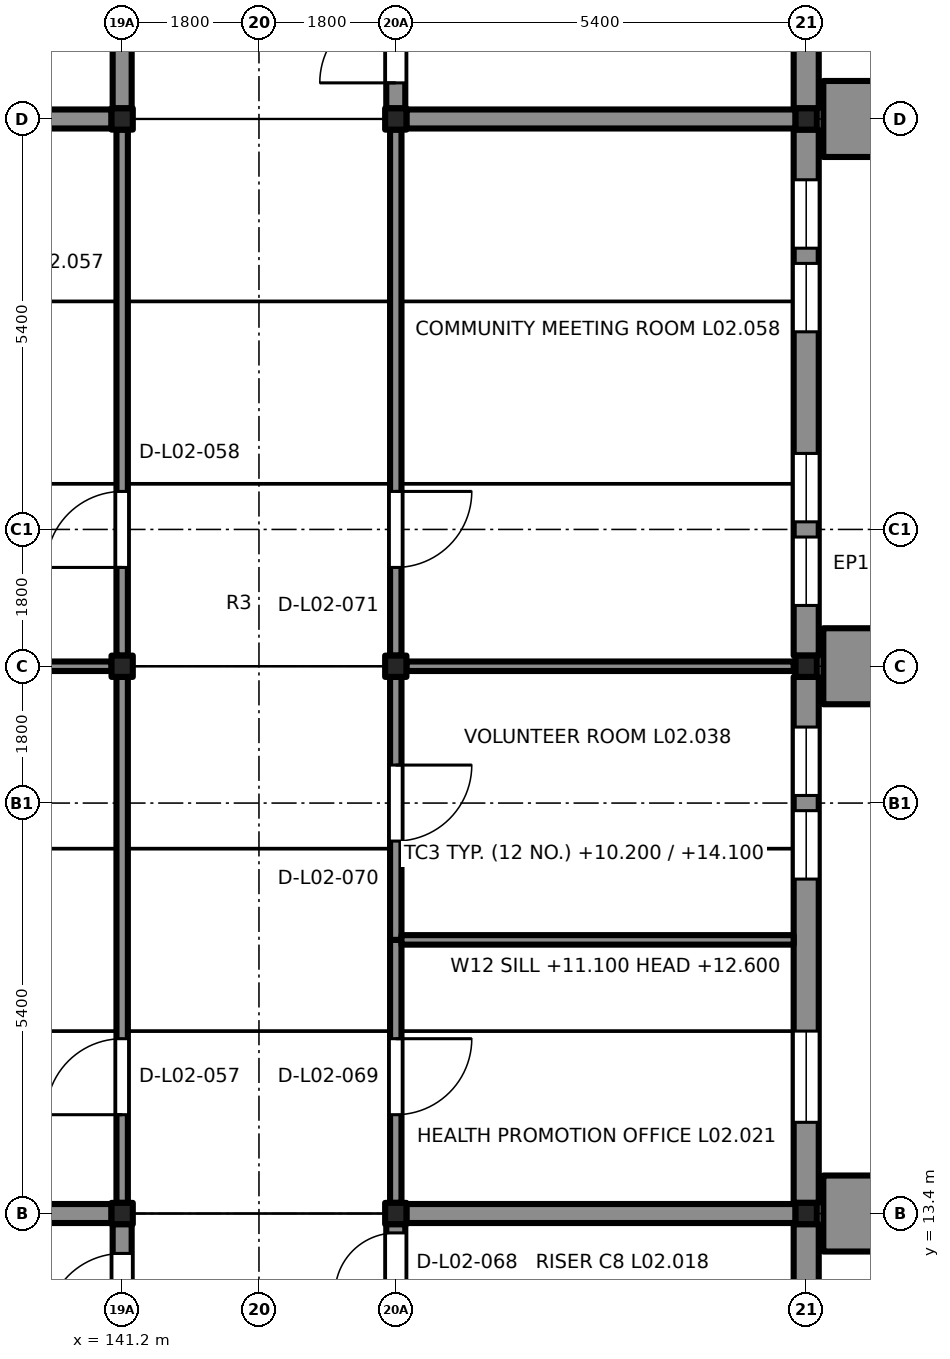
"""IFC4 building model, lengths in metres.
Left out: names, types, materials, properties, quantities, classifications, styles, units other than length and angle.
Written with IfcOpenShell. Run it as: python <this file> out.ifc"""

import sys

from ifc_helpers import new_model, si_unit, direction, frame, frame_2d, origin, origin_2d, place, context, subcontext, project, spatial, rectangle, extrude, element, fill, save


model = new_model("IFC4")
c1 = context("Model", 3, precision=1e-05, world=origin(), true_north=direction((0.0, 1.0)))
c2 = subcontext(c1, "Body", "Model", "MODEL_VIEW")
j1 = project(units=[si_unit("LENGTHUNIT", "METRE"), si_unit("PLANEANGLEUNIT", "RADIAN")], contexts=[c1])
p1 = place(None, origin())
s1 = spatial("IfcSite", under=j1, at=p1, CompositionType="ELEMENT")
p2 = place(p1, origin())
s2 = spatial("IfcBuilding", under=s1, at=p2, CompositionType="ELEMENT")
p3 = place(p2, frame((0.0, 0.0, 10.2)))
s3 = spatial("IfcBuildingStorey", under=s2, at=p3, CompositionType="ELEMENT", Elevation=10.2)
for number, where, z_axis, x_axis in (
    (1, (141.2, 13.4, 0.0), (0.0, 0.0, 1.0), (1.0, 0.0, 0.0)),
    (2, (144.8, 13.4, 0.0), (0.0, 0.0, 1.0), (1.0, 0.0, 0.0)),
    (3, (150.2, 13.4, 0.0), (0.0, 0.0, 1.0), (1.0, 0.0, 0.0)),
    (4, (141.2, 20.6, 0.0), (0.0, 0.0, 1.0), (1.0, 0.0, 0.0)),
    (5, (144.8, 20.6, 0.0), (0.0, 0.0, 1.0), (1.0, 0.0, 0.0)),
    (6, (150.2, 20.6, 0.0), (0.0, 0.0, 1.0), (1.0, 0.0, 0.0)),
    (7, (141.2, 27.8, 0.0), (0.0, 0.0, 1.0), (1.0, 0.0, 0.0)),
    (8, (144.8, 27.8, 0.0), (0.0, 0.0, 1.0), (1.0, 0.0, 0.0)),
    (9, (150.2, 27.8, 0.0), (0.0, 0.0, 1.0), (1.0, 0.0, 0.0)),
):
    element("IfcColumn", number, at=place(p3, frame(where, z_axis=z_axis, x_axis=x_axis)), inside=s3, PredefinedType="COLUMN", context=c2, shape_type="SweptSolid", body=[
        extrude(rectangle(XDim=0.28, YDim=0.28, at=origin_2d()), origin(), (0.0, 0.0, 1.0), 3.9),
    ])
p4 = place(p3, frame((141.2, 6.365, 0.0), z_axis=(0.0, 0.0, 1.0), x_axis=(0.0, 1.0, 0.0)))
e10 = element("IfcWall", 10, at=p4, inside=s3, PredefinedType="SHEAR", context=c2, shape_type="SweptSolid", body=[
    extrude(rectangle(XDim=6.895, YDim=0.25, at=frame_2d((3.448, 0.0))), origin(), (0.0, 0.0, 1.0), 3.2),
])
p5 = place(p4, frame((5.51, 0.0, 0.0)))
e11 = element("IfcOpeningElement", 11, at=p5, cuts=e10, PredefinedType="OPENING", context=c2, shape_type="SweptSolid", body=[
    extrude(rectangle(XDim=1.0, YDim=2.1, at=frame_2d((0.5, 1.05))), frame((0.0, 0.135, 0.0), z_axis=(0.0, -1.0, 0.0), x_axis=(1.0, 0.0, 0.0)), (0.0, 0.0, 1.0), 0.27),
])
p6 = place(p3, frame((135.94, 13.4, 0.0), z_axis=(0.0, 0.0, 1.0), x_axis=(1.0, 0.0, 0.0)))
e12 = element("IfcWall", 12, at=p6, inside=s3, PredefinedType="SHEAR", context=c2, shape_type="SweptSolid", body=[
    extrude(rectangle(XDim=5.12, YDim=0.25, at=frame_2d((2.56, 0.0))), origin(), (0.0, 0.0, 1.0), 3.2),
])
p7 = place(p3, frame((144.8, 6.365, 0.0), z_axis=(0.0, 0.0, 1.0), x_axis=(0.0, 1.0, 0.0)))
e13 = element("IfcWall", 13, at=p7, inside=s3, PredefinedType="SHEAR", context=c2, shape_type="SweptSolid", body=[
    extrude(rectangle(XDim=6.895, YDim=0.25, at=frame_2d((3.448, 0.0))), origin(), (0.0, 0.0, 1.0), 3.2),
])
p8 = place(p7, frame((0.75, 0.0, 0.0)))
e14 = element("IfcOpeningElement", 14, at=p8, cuts=e13, PredefinedType="OPENING", context=c2, shape_type="SweptSolid", body=[
    extrude(rectangle(XDim=1.0, YDim=2.1, at=frame_2d((0.5, 1.05))), frame((0.0, 0.135, 0.0), z_axis=(0.0, -1.0, 0.0), x_axis=(1.0, 0.0, 0.0)), (0.0, 0.0, 1.0), 0.27),
])
p9 = place(p7, frame((3.15, 0.0, 0.0)))
e15 = element("IfcOpeningElement", 15, at=p9, cuts=e13, PredefinedType="OPENING", context=c2, shape_type="SweptSolid", body=[
    extrude(rectangle(XDim=0.9, YDim=2.1, at=frame_2d((0.45, 1.05))), frame((0.0, 0.135, 0.0), z_axis=(0.0, -1.0, 0.0), x_axis=(1.0, 0.0, 0.0)), (0.0, 0.0, 1.0), 0.27),
])
p10 = place(p7, frame((4.8, 0.0, 0.0)))
e16 = element("IfcOpeningElement", 16, at=p10, cuts=e13, PredefinedType="OPENING", context=c2, shape_type="SweptSolid", body=[
    extrude(rectangle(XDim=0.8, YDim=2.1, at=frame_2d((0.4, 1.05))), frame((0.0, 0.135, 0.0), z_axis=(0.0, -1.0, 0.0), x_axis=(1.0, 0.0, 0.0)), (0.0, 0.0, 1.0), 0.27),
])
p11 = place(p7, frame((5.98, 0.0, 0.0)))
e17 = element("IfcOpeningElement", 17, at=p11, cuts=e13, PredefinedType="OPENING", context=c2, shape_type="SweptSolid", body=[
    extrude(rectangle(XDim=0.8, YDim=2.1, at=frame_2d((0.4, 1.05))), frame((0.0, 0.135, 0.0), z_axis=(0.0, -1.0, 0.0), x_axis=(1.0, 0.0, 0.0)), (0.0, 0.0, 1.0), 0.27),
])
p12 = place(p3, frame((144.94, 13.4, 0.0), z_axis=(0.0, 0.0, 1.0), x_axis=(1.0, 0.0, 0.0)))
e18 = element("IfcWall", 18, at=p12, inside=s3, PredefinedType="SHEAR", context=c2, shape_type="SweptSolid", body=[
    extrude(rectangle(XDim=5.12, YDim=0.25, at=frame_2d((2.56, 0.0))), origin(), (0.0, 0.0, 1.0), 3.2),
])
p13 = place(p3, frame((144.8, 27.94, 0.0), z_axis=(0.0, 0.0, 1.0), x_axis=(0.0, 1.0, 0.0)))
e19 = element("IfcWall", 19, at=p13, inside=s3, PredefinedType="SHEAR", context=c2, shape_type="SweptSolid", body=[
    extrude(rectangle(XDim=6.92, YDim=0.25, at=frame_2d((3.46, 0.0))), origin(), (0.0, 0.0, 1.0), 3.2),
])
p14 = place(p13, frame((0.335, 0.0, 0.0)))
e20 = element("IfcOpeningElement", 20, at=p14, cuts=e19, PredefinedType="OPENING", context=c2, shape_type="SweptSolid", body=[
    extrude(rectangle(XDim=1.0, YDim=2.1, at=frame_2d((0.5, 1.05))), frame((0.0, 0.135, 0.0), z_axis=(0.0, -1.0, 0.0), x_axis=(1.0, 0.0, 0.0)), (0.0, 0.0, 1.0), 0.27),
])
p15 = place(p3, frame((144.94, 27.8, 0.0), z_axis=(0.0, 0.0, 1.0), x_axis=(1.0, 0.0, 0.0)))
e21 = element("IfcWall", 21, at=p15, inside=s3, PredefinedType="SHEAR", context=c2, shape_type="SweptSolid", body=[
    extrude(rectangle(XDim=5.12, YDim=0.25, at=frame_2d((2.56, 0.0))), origin(), (0.0, 0.0, 1.0), 3.2),
])
p16 = place(p3, frame((141.2, 27.94, 0.0), z_axis=(0.0, 0.0, 1.0), x_axis=(0.0, 1.0, 0.0)))
e22 = element("IfcWall", 22, at=p16, inside=s3, PredefinedType="SHEAR", context=c2, shape_type="SweptSolid", body=[
    extrude(rectangle(XDim=6.92, YDim=0.25, at=frame_2d((3.46, 0.0))), origin(), (0.0, 0.0, 1.0), 3.2),
])
p17 = place(p16, frame((4.16, 0.0, 0.0)))
e23 = element("IfcOpeningElement", 23, at=p17, cuts=e22, PredefinedType="OPENING", context=c2, shape_type="SweptSolid", body=[
    extrude(rectangle(XDim=1.8, YDim=2.1, at=frame_2d((0.9, 1.05))), frame((0.0, 0.135, 0.0), z_axis=(0.0, -1.0, 0.0), x_axis=(1.0, 0.0, 0.0)), (0.0, 0.0, 1.0), 0.27),
])
p18 = place(p3, frame((135.94, 27.8, 0.0), z_axis=(0.0, 0.0, 1.0), x_axis=(1.0, 0.0, 0.0)))
e24 = element("IfcWall", 24, at=p18, inside=s3, PredefinedType="SHEAR", context=c2, shape_type="SweptSolid", body=[
    extrude(rectangle(XDim=5.12, YDim=0.25, at=frame_2d((2.56, 0.0))), origin(), (0.0, 0.0, 1.0), 3.2),
])
p19 = place(p3, frame((150.2, 13.26, 0.0), z_axis=(0.0, 0.0, 1.0), x_axis=(0.0, -1.0, 0.0)))
e25 = element("IfcWall", 25, at=p19, inside=s3, PredefinedType="SOLIDWALL", context=c2, shape_type="SweptSolid", body=[
    extrude(rectangle(XDim=5.529, YDim=0.33, at=frame_2d((2.765, 0.0))), origin(), (0.0, 0.0, 1.0), 3.2),
])
p20 = place(p3, frame((150.2, 20.46, 0.0), z_axis=(0.0, 0.0, 1.0), x_axis=(0.0, -1.0, 0.0)))
e26 = element("IfcWall", 26, at=p20, inside=s3, PredefinedType="SOLIDWALL", context=c2, shape_type="SweptSolid", body=[
    extrude(rectangle(XDim=6.92, YDim=0.33, at=frame_2d((3.46, 0.0))), origin(), (0.0, 0.0, 1.0), 3.2),
])
p21 = place(p20, frame((4.66, 0.0, 0.9)))
e27 = element("IfcOpeningElement", 27, at=p21, cuts=e26, PredefinedType="OPENING", context=c2, shape_type="SweptSolid", body=[
    extrude(rectangle(XDim=1.2, YDim=1.5, at=frame_2d((0.6, 0.75))), frame((0.0, 0.175, 0.0), z_axis=(0.0, -1.0, 0.0), x_axis=(1.0, 0.0, 0.0)), (0.0, 0.0, 1.0), 0.35),
])
p22 = place(p20, frame((1.76, 0.0, 0.6)))
e28 = element("IfcOpeningElement", 28, at=p22, cuts=e26, PredefinedType="OPENING", context=c2, shape_type="SweptSolid", body=[
    extrude(rectangle(XDim=0.9, YDim=2.4, at=frame_2d((0.45, 1.2))), frame((0.0, 0.175, 0.0), z_axis=(0.0, -1.0, 0.0), x_axis=(1.0, 0.0, 0.0)), (0.0, 0.0, 1.0), 0.35),
])
p23 = place(p20, frame((0.66, 0.0, 0.6)))
e29 = element("IfcOpeningElement", 29, at=p23, cuts=e26, PredefinedType="OPENING", context=c2, shape_type="SweptSolid", body=[
    extrude(rectangle(XDim=0.9, YDim=2.4, at=frame_2d((0.45, 1.2))), frame((0.0, 0.175, 0.0), z_axis=(0.0, -1.0, 0.0), x_axis=(1.0, 0.0, 0.0)), (0.0, 0.0, 1.0), 0.35),
])
p24 = place(p3, frame((150.2, 27.66, 0.0), z_axis=(0.0, 0.0, 1.0), x_axis=(0.0, -1.0, 0.0)))
e30 = element("IfcWall", 30, at=p24, inside=s3, PredefinedType="SOLIDWALL", context=c2, shape_type="SweptSolid", body=[
    extrude(rectangle(XDim=6.92, YDim=0.33, at=frame_2d((3.46, 0.0))), origin(), (0.0, 0.0, 1.0), 3.2),
])
p25 = place(p24, frame((5.36, 0.0, 0.6)))
e31 = element("IfcOpeningElement", 31, at=p25, cuts=e30, PredefinedType="OPENING", context=c2, shape_type="SweptSolid", body=[
    extrude(rectangle(XDim=0.9, YDim=2.4, at=frame_2d((0.45, 1.2))), frame((0.0, 0.175, 0.0), z_axis=(0.0, -1.0, 0.0), x_axis=(1.0, 0.0, 0.0)), (0.0, 0.0, 1.0), 0.35),
])
p26 = place(p24, frame((4.26, 0.0, 0.6)))
e32 = element("IfcOpeningElement", 32, at=p26, cuts=e30, PredefinedType="OPENING", context=c2, shape_type="SweptSolid", body=[
    extrude(rectangle(XDim=0.9, YDim=2.4, at=frame_2d((0.45, 1.2))), frame((0.0, 0.175, 0.0), z_axis=(0.0, -1.0, 0.0), x_axis=(1.0, 0.0, 0.0)), (0.0, 0.0, 1.0), 0.35),
])
p27 = place(p24, frame((1.76, 0.0, 0.6)))
e33 = element("IfcOpeningElement", 33, at=p27, cuts=e30, PredefinedType="OPENING", context=c2, shape_type="SweptSolid", body=[
    extrude(rectangle(XDim=0.9, YDim=2.4, at=frame_2d((0.45, 1.2))), frame((0.0, 0.175, 0.0), z_axis=(0.0, -1.0, 0.0), x_axis=(1.0, 0.0, 0.0)), (0.0, 0.0, 1.0), 0.35),
])
p28 = place(p24, frame((0.66, 0.0, 0.6)))
e34 = element("IfcOpeningElement", 34, at=p28, cuts=e30, PredefinedType="OPENING", context=c2, shape_type="SweptSolid", body=[
    extrude(rectangle(XDim=0.9, YDim=2.4, at=frame_2d((0.45, 1.2))), frame((0.0, 0.175, 0.0), z_axis=(0.0, -1.0, 0.0), x_axis=(1.0, 0.0, 0.0)), (0.0, 0.0, 1.0), 0.35),
])
p29 = place(p3, frame((150.2, 30.7, 0.0), z_axis=(0.0, 0.0, 1.0), x_axis=(0.0, -1.0, 0.0)))
e35 = element("IfcWall", 35, at=p29, inside=s3, PredefinedType="SOLIDWALL", context=c2, shape_type="SweptSolid", body=[
    extrude(rectangle(XDim=2.76, YDim=0.33, at=frame_2d((1.38, 0.0))), origin(), (0.0, 0.0, 1.0), 3.2),
])
for number, where, z_axis, x_axis in (
    (36, (150.8, 13.9, 0.0), (0.0, 0.0, 1.0), (0.0, -1.0, 0.0)),
    (37, (150.8, 21.1, 0.0), (0.0, 0.0, 1.0), (0.0, -1.0, 0.0)),
    (38, (150.8, 28.3, 0.0), (0.0, 0.0, 1.0), (0.0, -1.0, 0.0)),
):
    element("IfcWall", number, at=place(p3, frame(where, z_axis=z_axis, x_axis=x_axis)), inside=s3, PredefinedType="SOLIDWALL", context=c2, shape_type="SweptSolid", body=[
        extrude(rectangle(XDim=1.0, YDim=0.75, at=frame_2d((0.5, 0.0))), origin(), (0.0, 0.0, 1.0), 3.9),
    ])
p30 = place(p3, frame((141.2, 13.54, 0.0), z_axis=(0.0, 0.0, 1.0), x_axis=(0.0, 1.0, 0.0)))
e39 = element("IfcWall", 39, at=p30, inside=s3, PredefinedType="PARTITIONING", context=c2, shape_type="SweptSolid", body=[
    extrude(rectangle(XDim=6.92, YDim=0.15, at=frame_2d((3.46, 0.0))), origin(), (0.0, 0.0, 1.0), 4.467),
])
p31 = place(p30, frame((1.16, 0.0, 0.0)))
e40 = element("IfcOpeningElement", 40, at=p31, cuts=e39, PredefinedType="OPENING", context=c2, shape_type="SweptSolid", body=[
    extrude(rectangle(XDim=1.0, YDim=2.1, at=frame_2d((0.5, 1.05))), frame((0.0, 0.085, 0.0), z_axis=(0.0, -1.0, 0.0), x_axis=(1.0, 0.0, 0.0)), (0.0, 0.0, 1.0), 0.17),
])
p32 = place(p3, frame((141.2, 20.74, 0.0), z_axis=(0.0, 0.0, 1.0), x_axis=(0.0, 1.0, 0.0)))
e41 = element("IfcWall", 41, at=p32, inside=s3, PredefinedType="PARTITIONING", context=c2, shape_type="SweptSolid", body=[
    extrude(rectangle(XDim=6.92, YDim=0.15, at=frame_2d((3.46, 0.0))), origin(), (0.0, 0.0, 1.0), 4.467),
])
p33 = place(p32, frame((1.16, 0.0, 0.0)))
e42 = element("IfcOpeningElement", 42, at=p33, cuts=e41, PredefinedType="OPENING", context=c2, shape_type="SweptSolid", body=[
    extrude(rectangle(XDim=1.0, YDim=2.1, at=frame_2d((0.5, 1.05))), frame((0.0, 0.085, 0.0), z_axis=(0.0, -1.0, 0.0), x_axis=(1.0, 0.0, 0.0)), (0.0, 0.0, 1.0), 0.17),
])
p34 = place(p3, frame((135.965, 20.6, 0.0), z_axis=(0.0, 0.0, 1.0), x_axis=(1.0, 0.0, 0.0)))
e43 = element("IfcWall", 43, at=p34, inside=s3, PredefinedType="PARTITIONING", context=c2, shape_type="SweptSolid", body=[
    extrude(rectangle(XDim=5.095, YDim=0.125, at=frame_2d((2.547, 0.0))), origin(), (0.0, 0.0, 1.0), 3.9),
])
p35 = place(p3, frame((144.8, 17.0, 0.0), z_axis=(0.0, 0.0, 1.0), x_axis=(0.0, -1.0, 0.0)))
e44 = element("IfcWall", 44, at=p35, inside=s3, PredefinedType="PARTITIONING", context=c2, shape_type="SweptSolid", body=[
    extrude(rectangle(XDim=3.46, YDim=0.15, at=frame_2d((1.73, 0.0))), origin(), (0.0, 0.0, 1.0), 4.467),
])
p36 = place(p35, frame((1.3, 0.0, 0.0)))
e45 = element("IfcOpeningElement", 45, at=p36, cuts=e44, PredefinedType="OPENING", context=c2, shape_type="SweptSolid", body=[
    extrude(rectangle(XDim=1.0, YDim=2.1, at=frame_2d((0.5, 1.05))), frame((0.0, 0.085, 0.0), z_axis=(0.0, -1.0, 0.0), x_axis=(1.0, 0.0, 0.0)), (0.0, 0.0, 1.0), 0.17),
])
p37 = place(p3, frame((144.8, 20.46, 0.0), z_axis=(0.0, 0.0, 1.0), x_axis=(0.0, -1.0, 0.0)))
e46 = element("IfcWall", 46, at=p37, inside=s3, PredefinedType="PARTITIONING", context=c2, shape_type="SweptSolid", body=[
    extrude(rectangle(XDim=3.46, YDim=0.15, at=frame_2d((1.73, 0.0))), origin(), (0.0, 0.0, 1.0), 4.467),
])
p38 = place(p37, frame((1.16, 0.0, 0.0)))
e47 = element("IfcOpeningElement", 47, at=p38, cuts=e46, PredefinedType="OPENING", context=c2, shape_type="SweptSolid", body=[
    extrude(rectangle(XDim=1.0, YDim=2.1, at=frame_2d((0.5, 1.05))), frame((0.0, 0.085, 0.0), z_axis=(0.0, -1.0, 0.0), x_axis=(1.0, 0.0, 0.0)), (0.0, 0.0, 1.0), 0.17),
])
p39 = place(p3, frame((150.035, 17.0, 0.0), z_axis=(0.0, 0.0, 1.0), x_axis=(-1.0, 0.0, 0.0)))
e48 = element("IfcWall", 48, at=p39, inside=s3, PredefinedType="PARTITIONING", context=c2, shape_type="SweptSolid", body=[
    extrude(rectangle(XDim=5.16, YDim=0.125, at=frame_2d((2.58, 0.0))), origin(), (0.0, 0.0, 1.0), 4.467),
])
p40 = place(p3, frame((144.8, 27.66, 0.0), z_axis=(0.0, 0.0, 1.0), x_axis=(0.0, -1.0, 0.0)))
e49 = element("IfcWall", 49, at=p40, inside=s3, PredefinedType="PARTITIONING", context=c2, shape_type="SweptSolid", body=[
    extrude(rectangle(XDim=6.92, YDim=0.15, at=frame_2d((3.46, 0.0))), origin(), (0.0, 0.0, 1.0), 4.467),
])
p41 = place(p40, frame((4.76, 0.0, 0.0)))
e50 = element("IfcOpeningElement", 50, at=p41, cuts=e49, PredefinedType="OPENING", context=c2, shape_type="SweptSolid", body=[
    extrude(rectangle(XDim=1.0, YDim=2.1, at=frame_2d((0.5, 1.05))), frame((0.0, 0.085, 0.0), z_axis=(0.0, -1.0, 0.0), x_axis=(1.0, 0.0, 0.0)), (0.0, 0.0, 1.0), 0.17),
])
p42 = place(p3, frame((150.035, 20.6, 0.0), z_axis=(0.0, 0.0, 1.0), x_axis=(-1.0, 0.0, 0.0)))
e51 = element("IfcWall", 51, at=p42, inside=s3, PredefinedType="PARTITIONING", context=c2, shape_type="SweptSolid", body=[
    extrude(rectangle(XDim=5.095, YDim=0.125, at=frame_2d((2.547, 0.0))), origin(), (0.0, 0.0, 1.0), 3.9),
])
p43 = place(p5, origin())
e52 = element("IfcDoor", 52, at=p43, inside=s3, OperationType="SINGLE_SWING_RIGHT", PredefinedType="DOOR", context=c2, shape_type="SweptSolid", body=[
    extrude(rectangle(XDim=1.0, YDim=2.1, at=frame_2d((0.5, 1.05))), frame((0.0, 0.025, 0.0), z_axis=(0.0, -1.0, 0.0), x_axis=(1.0, 0.0, 0.0)), (0.0, 0.0, 1.0), 0.05),
])
fill(e11, e52)
p44 = place(p11, origin())
e53 = element("IfcDoor", 53, at=p44, inside=s3, OperationType="SINGLE_SWING_LEFT", PredefinedType="DOOR", context=c2, shape_type="SweptSolid", body=[
    extrude(rectangle(XDim=0.8, YDim=2.1, at=frame_2d((0.4, 1.05))), frame((0.0, 0.025, 0.0), z_axis=(0.0, -1.0, 0.0), x_axis=(1.0, 0.0, 0.0)), (0.0, 0.0, 1.0), 0.05),
])
fill(e17, e53)
p45 = place(p14, origin())
e54 = element("IfcDoor", 54, at=p45, inside=s3, OperationType="SINGLE_SWING_LEFT", PredefinedType="DOOR", context=c2, shape_type="SweptSolid", body=[
    extrude(rectangle(XDim=1.0, YDim=2.1, at=frame_2d((0.5, 1.05))), frame((0.0, 0.025, 0.0), z_axis=(0.0, -1.0, 0.0), x_axis=(1.0, 0.0, 0.0)), (0.0, 0.0, 1.0), 0.05),
])
fill(e20, e54)
p46 = place(p21, origin())
e55 = element("IfcWindow", 55, at=p46, inside=s3, PartitioningType="SINGLE_PANEL", PredefinedType="WINDOW", context=c2, shape_type="SweptSolid", body=[
    extrude(rectangle(XDim=1.2, YDim=1.5, at=frame_2d((0.6, 0.75))), frame((0.0, -0.03, 0.0), z_axis=(0.0, -1.0, 0.0), x_axis=(1.0, 0.0, 0.0)), (0.0, 0.0, 1.0), 0.06),
])
fill(e27, e55)
p47 = place(p22, origin())
e56 = element("IfcWindow", 56, at=p47, inside=s3, PartitioningType="SINGLE_PANEL", PredefinedType="WINDOW", context=c2, shape_type="SweptSolid", body=[
    extrude(rectangle(XDim=0.9, YDim=2.4, at=frame_2d((0.45, 1.2))), frame((0.0, -0.03, 0.0), z_axis=(0.0, -1.0, 0.0), x_axis=(1.0, 0.0, 0.0)), (0.0, 0.0, 1.0), 0.06),
])
fill(e28, e56)
p48 = place(p23, origin())
e57 = element("IfcWindow", 57, at=p48, inside=s3, PartitioningType="SINGLE_PANEL", PredefinedType="WINDOW", context=c2, shape_type="SweptSolid", body=[
    extrude(rectangle(XDim=0.9, YDim=2.4, at=frame_2d((0.45, 1.2))), frame((0.0, -0.03, 0.0), z_axis=(0.0, -1.0, 0.0), x_axis=(1.0, 0.0, 0.0)), (0.0, 0.0, 1.0), 0.06),
])
fill(e29, e57)
p49 = place(p25, origin())
e58 = element("IfcWindow", 58, at=p49, inside=s3, PartitioningType="SINGLE_PANEL", PredefinedType="WINDOW", context=c2, shape_type="SweptSolid", body=[
    extrude(rectangle(XDim=0.9, YDim=2.4, at=frame_2d((0.45, 1.2))), frame((0.0, -0.03, 0.0), z_axis=(0.0, -1.0, 0.0), x_axis=(1.0, 0.0, 0.0)), (0.0, 0.0, 1.0), 0.06),
])
fill(e31, e58)
p50 = place(p26, origin())
e59 = element("IfcWindow", 59, at=p50, inside=s3, PartitioningType="SINGLE_PANEL", PredefinedType="WINDOW", context=c2, shape_type="SweptSolid", body=[
    extrude(rectangle(XDim=0.9, YDim=2.4, at=frame_2d((0.45, 1.2))), frame((0.0, -0.03, 0.0), z_axis=(0.0, -1.0, 0.0), x_axis=(1.0, 0.0, 0.0)), (0.0, 0.0, 1.0), 0.06),
])
fill(e32, e59)
p51 = place(p27, origin())
e60 = element("IfcWindow", 60, at=p51, inside=s3, PartitioningType="SINGLE_PANEL", PredefinedType="WINDOW", context=c2, shape_type="SweptSolid", body=[
    extrude(rectangle(XDim=0.9, YDim=2.4, at=frame_2d((0.45, 1.2))), frame((0.0, -0.03, 0.0), z_axis=(0.0, -1.0, 0.0), x_axis=(1.0, 0.0, 0.0)), (0.0, 0.0, 1.0), 0.06),
])
fill(e33, e60)
p52 = place(p28, origin())
e61 = element("IfcWindow", 61, at=p52, inside=s3, PartitioningType="SINGLE_PANEL", PredefinedType="WINDOW", context=c2, shape_type="SweptSolid", body=[
    extrude(rectangle(XDim=0.9, YDim=2.4, at=frame_2d((0.45, 1.2))), frame((0.0, -0.03, 0.0), z_axis=(0.0, -1.0, 0.0), x_axis=(1.0, 0.0, 0.0)), (0.0, 0.0, 1.0), 0.06),
])
fill(e34, e61)
p53 = place(p31, origin())
e62 = element("IfcDoor", 62, at=p53, inside=s3, OperationType="SINGLE_SWING_LEFT", PredefinedType="DOOR", context=c2, shape_type="SweptSolid", body=[
    extrude(rectangle(XDim=1.0, YDim=2.1, at=frame_2d((0.5, 1.05))), frame((0.0, 0.025, 0.0), z_axis=(0.0, -1.0, 0.0), x_axis=(1.0, 0.0, 0.0)), (0.0, 0.0, 1.0), 0.05),
])
fill(e40, e62)
p54 = place(p33, origin())
e63 = element("IfcDoor", 63, at=p54, inside=s3, OperationType="SINGLE_SWING_LEFT", PredefinedType="DOOR", context=c2, shape_type="SweptSolid", body=[
    extrude(rectangle(XDim=1.0, YDim=2.1, at=frame_2d((0.5, 1.05))), frame((0.0, 0.025, 0.0), z_axis=(0.0, -1.0, 0.0), x_axis=(1.0, 0.0, 0.0)), (0.0, 0.0, 1.0), 0.05),
])
fill(e42, e63)
p55 = place(p36, origin())
e64 = element("IfcDoor", 64, at=p55, inside=s3, OperationType="SINGLE_SWING_RIGHT", PredefinedType="DOOR", context=c2, shape_type="SweptSolid", body=[
    extrude(rectangle(XDim=1.0, YDim=2.1, at=frame_2d((0.5, 1.05))), frame((0.0, 0.025, 0.0), z_axis=(0.0, -1.0, 0.0), x_axis=(1.0, 0.0, 0.0)), (0.0, 0.0, 1.0), 0.05),
])
fill(e45, e64)
p56 = place(p38, origin())
e65 = element("IfcDoor", 65, at=p56, inside=s3, OperationType="SINGLE_SWING_LEFT", PredefinedType="DOOR", context=c2, shape_type="SweptSolid", body=[
    extrude(rectangle(XDim=1.0, YDim=2.1, at=frame_2d((0.5, 1.05))), frame((0.0, 0.025, 0.0), z_axis=(0.0, -1.0, 0.0), x_axis=(1.0, 0.0, 0.0)), (0.0, 0.0, 1.0), 0.05),
])
fill(e47, e65)
p57 = place(p41, origin())
e66 = element("IfcDoor", 66, at=p57, inside=s3, OperationType="SINGLE_SWING_RIGHT", PredefinedType="DOOR", context=c2, shape_type="SweptSolid", body=[
    extrude(rectangle(XDim=1.0, YDim=2.1, at=frame_2d((0.5, 1.05))), frame((0.0, 0.025, 0.0), z_axis=(0.0, -1.0, 0.0), x_axis=(1.0, 0.0, 0.0)), (0.0, 0.0, 1.0), 0.05),
])
fill(e50, e66)
save(model, sys.argv[1])
